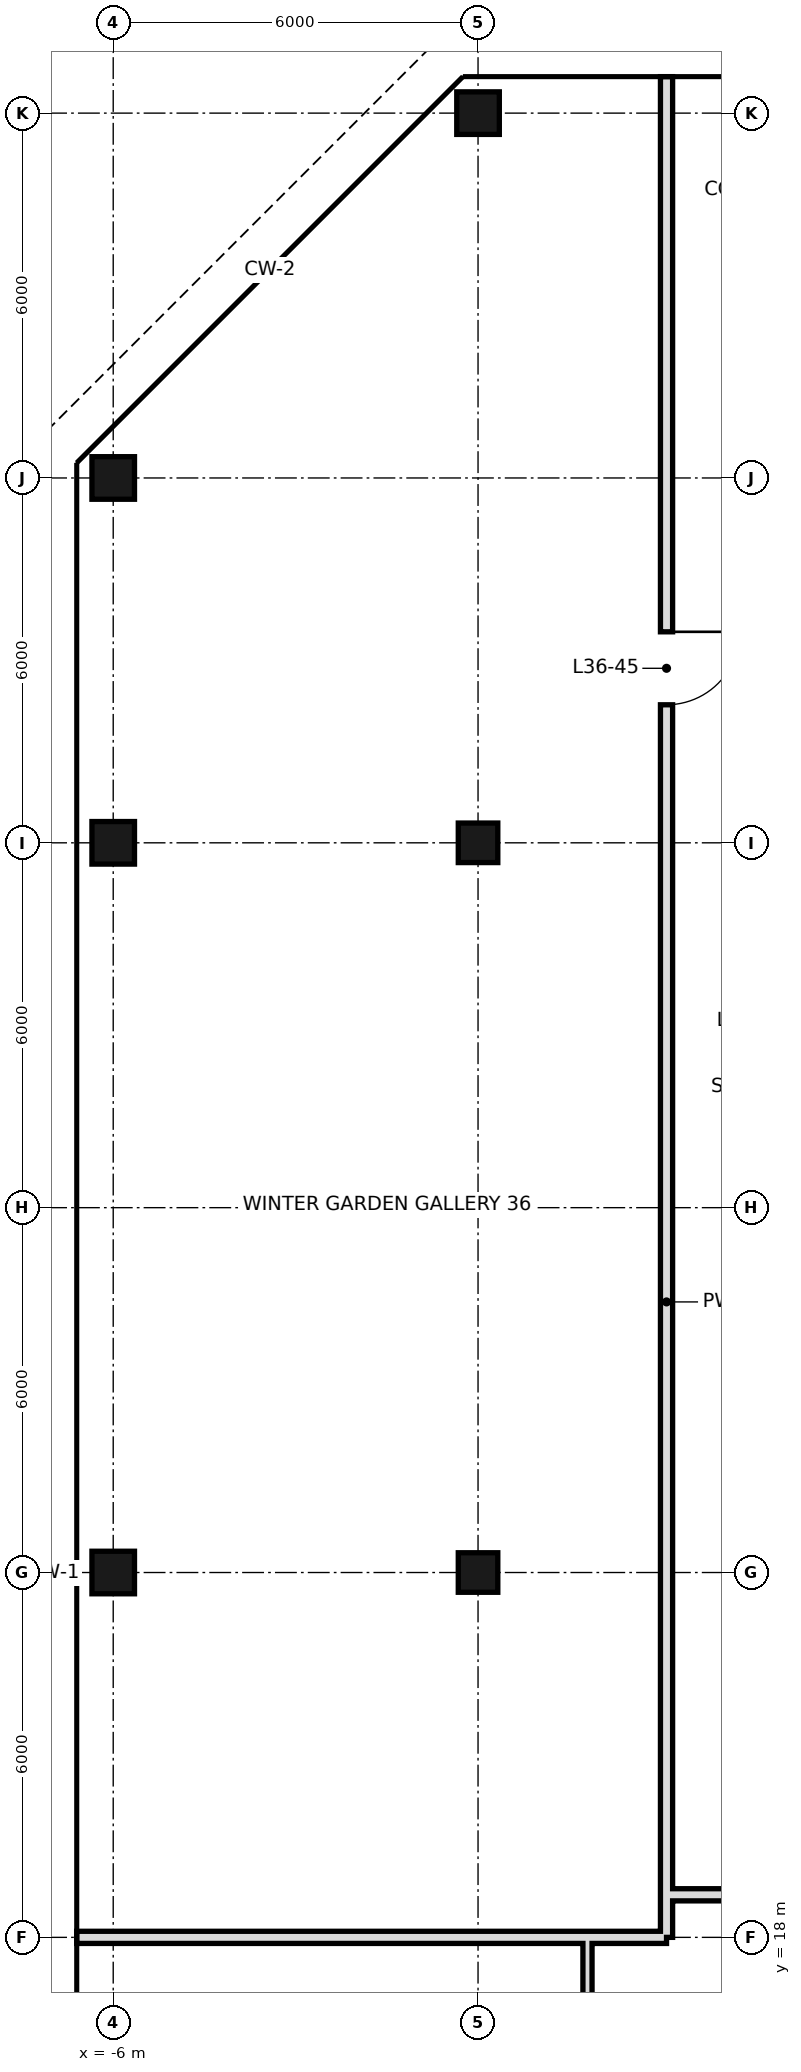
"""IFC4 building model, lengths in metres.
Left out: names, types, materials, properties, quantities, classifications, styles, units other than length and angle.
Written with IfcOpenShell. Run it as: python <this file> out.ifc"""

import sys

from ifc_helpers import new_model, si_unit, direction, frame, frame_2d, origin, origin_2d, place, context, subcontext, project, spatial, rectangle, hollow_rectangle, extrude, element, fill, save


model = new_model("IFC4")
c1 = context("Model", 3, precision=1e-05, world=origin(), true_north=direction((0.0, 1.0)))
c2 = subcontext(c1, "Body", "Model", "MODEL_VIEW")
j1 = project(units=[si_unit("LENGTHUNIT", "METRE"), si_unit("PLANEANGLEUNIT", "RADIAN")], contexts=[c1])
p1 = place(None, origin())
s1 = spatial("IfcSite", under=j1, at=p1, CompositionType="ELEMENT")
p2 = place(p1, origin())
s2 = spatial("IfcBuilding", under=s1, at=p2, CompositionType="ELEMENT")
p3 = place(p2, frame((0.0, 0.0, 158.2)))
s3 = spatial("IfcBuildingStorey", under=s2, at=p3, CompositionType="ELEMENT", Elevation=158.2)
for number, where, z_axis, x_axis in (
    (1, (-6.0, 24.0, 0.0), (0.0, 0.0, 1.0), (1.0, 0.0, 0.0)),
    (2, (-6.0, 36.0, 0.0), (0.0, 0.0, 1.0), (1.0, 0.0, 0.0)),
    (3, (-6.0, 42.0, 0.0), (0.0, 0.0, 1.0), (1.0, 0.0, 0.0)),
):
    element("IfcColumn", number, at=place(p3, frame(where, z_axis=z_axis, x_axis=x_axis)), inside=s3, PredefinedType="COLUMN", context=c2, shape_type="SweptSolid", body=[
        extrude(hollow_rectangle(XDim=0.7, YDim=0.7, WallThickness=0.036, at=origin_2d()), origin(), (0.0, 0.0, 1.0), 3.6),
    ])
for number, where, z_axis, x_axis in (
    (4, (0.0, 24.0, 0.0), (0.0, 0.0, 1.0), (1.0, 0.0, 0.0)),
    (5, (0.0, 36.0, 0.0), (0.0, 0.0, 1.0), (1.0, 0.0, 0.0)),
):
    element("IfcColumn", number, at=place(p3, frame(where, z_axis=z_axis, x_axis=x_axis)), inside=s3, PredefinedType="COLUMN", context=c2, shape_type="SweptSolid", body=[
        extrude(hollow_rectangle(XDim=0.65, YDim=0.65, WallThickness=0.032, at=origin_2d()), origin(), (0.0, 0.0, 1.0), 3.6),
    ])
p4 = place(p3, frame((0.0, 48.0, 0.0), z_axis=(0.0, 0.0, 1.0), x_axis=(1.0, 0.0, 0.0)))
e6 = element("IfcColumn", 6, at=p4, inside=s3, PredefinedType="COLUMN", context=c2, shape_type="SweptSolid", body=[
    extrude(hollow_rectangle(XDim=0.7, YDim=0.7, WallThickness=0.036, at=origin_2d()), origin(), (0.0, 0.0, 1.0), 3.6),
])
p5 = place(p3, frame((1.8, 10.8, 0.0), z_axis=(0.0, 0.0, 1.0), x_axis=(0.0, 1.0, 0.0)))
e7 = element("IfcWall", 7, at=p5, inside=s3, PredefinedType="PARTITIONING", context=c2, shape_type="SweptSolid", body=[
    extrude(rectangle(XDim=7.2, YDim=0.15, at=frame_2d((3.6, 0.0))), origin(), (0.0, 0.0, 1.0), 3.38),
])
p6 = place(p3, frame((3.1, 18.0, 0.0), z_axis=(0.0, 0.0, 1.0), x_axis=(0.0, 1.0, 0.0)))
e8 = element("IfcWall", 8, at=p6, inside=s3, PredefinedType="SOLIDWALL", context=c2, shape_type="SweptSolid", body=[
    extrude(rectangle(XDim=30.6, YDim=0.2, at=frame_2d((15.3, 0.0))), origin(), (0.0, 0.0, 1.0), 2.68),
])
p7 = place(p6, frame((20.27, 0.0, 0.0)))
e9 = element("IfcOpeningElement", 9, at=p7, cuts=e8, PredefinedType="OPENING", context=c2, shape_type="SweptSolid", body=[
    extrude(rectangle(XDim=1.2, YDim=2.4, at=frame_2d((0.6, 1.2))), frame((0.0, 0.11, 0.0), z_axis=(0.0, -1.0, 0.0), x_axis=(1.0, 0.0, 0.0)), (0.0, 0.0, 1.0), 0.22),
])
p8 = place(p3, frame((-6.6, 18.0, 0.0), z_axis=(0.0, 0.0, 1.0), x_axis=(1.0, 0.0, 0.0)))
e10 = element("IfcWall", 10, at=p8, inside=s3, PredefinedType="SOLIDWALL", context=c2, shape_type="SweptSolid", body=[
    extrude(rectangle(XDim=9.7, YDim=0.2, at=frame_2d((4.85, 0.0))), origin(), (0.0, 0.0, 1.0), 2.68),
])
p9 = place(p3, frame((3.1, 18.7, 0.0), z_axis=(0.0, 0.0, 1.0), x_axis=(1.0, 0.0, 0.0)))
e11 = element("IfcWall", 11, at=p9, inside=s3, PredefinedType="SOLIDWALL", context=c2, shape_type="SweptSolid", body=[
    extrude(rectangle(XDim=11.3, YDim=0.2, at=frame_2d((5.65, 0.0))), origin(), (0.0, 0.0, 1.0), 2.68),
])
p10 = place(p7, origin())
e12 = element("IfcDoor", 12, at=p10, inside=s3, OperationType="SINGLE_SWING_RIGHT", PredefinedType="DOOR", context=c2, shape_type="SweptSolid", body=[
    extrude(rectangle(XDim=1.2, YDim=2.4, at=frame_2d((0.6, 1.2))), frame((0.0, 0.025, 0.0), z_axis=(0.0, -1.0, 0.0), x_axis=(1.0, 0.0, 0.0)), (0.0, 0.0, 1.0), 0.05),
])
fill(e9, e12)
save(model, sys.argv[1])
